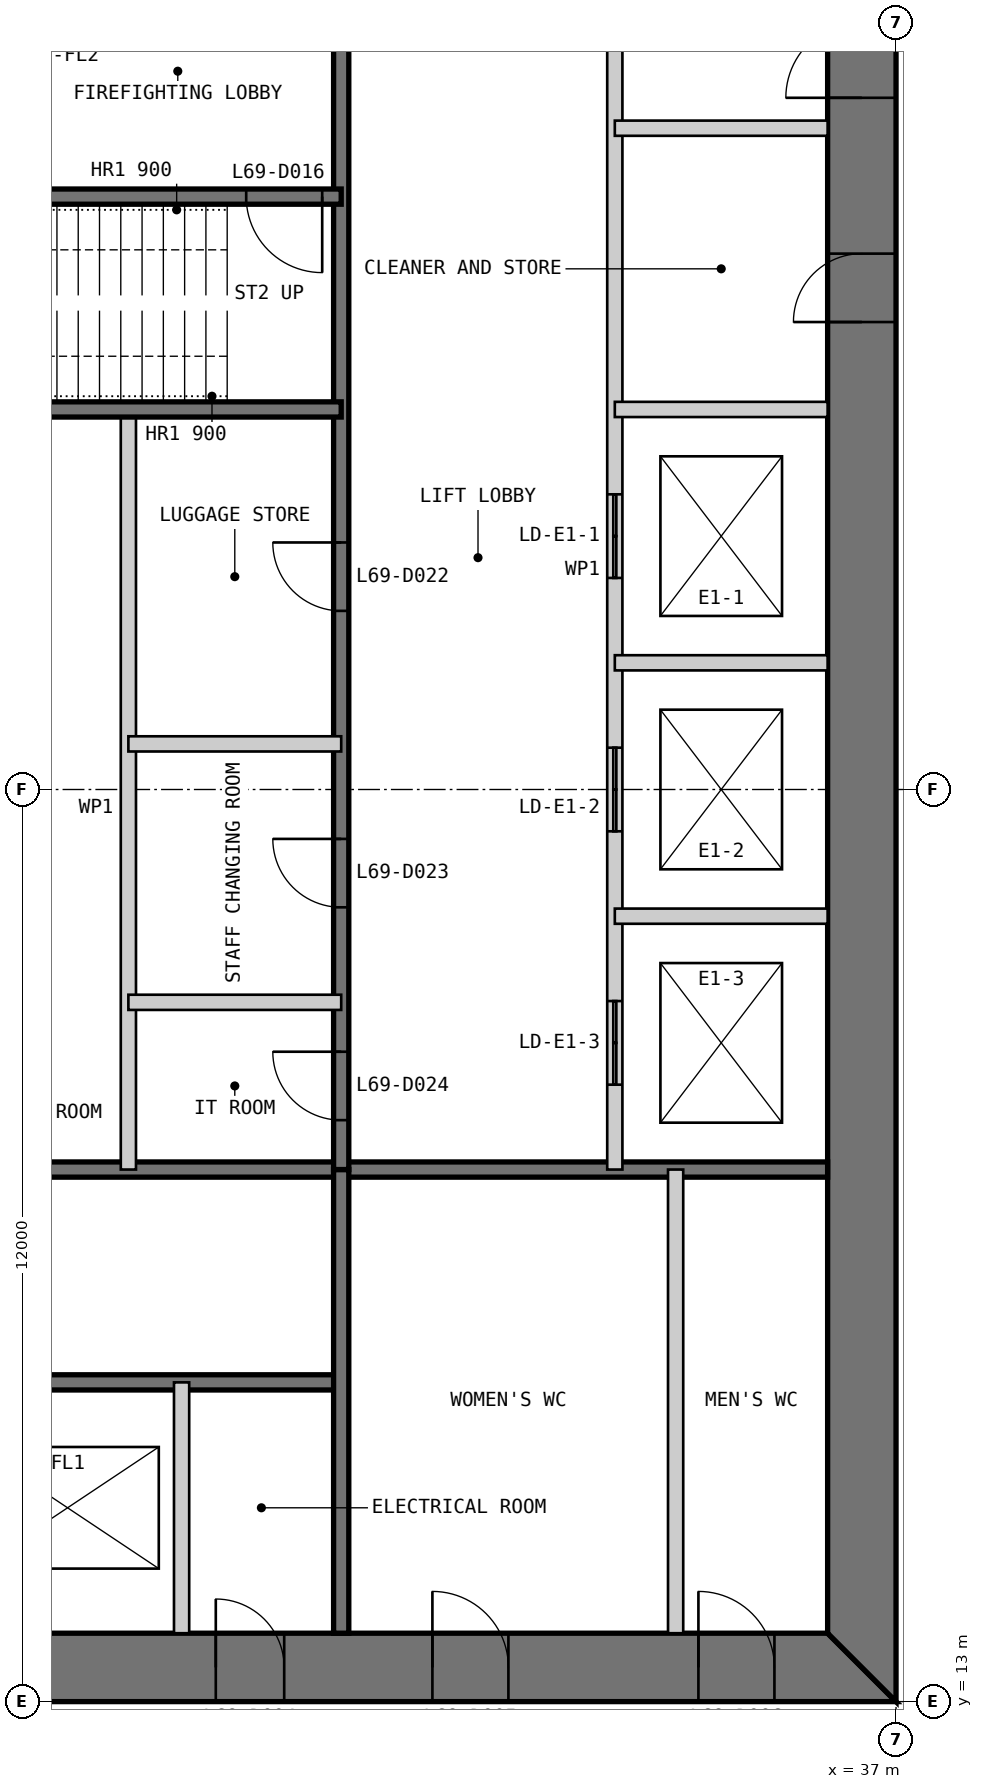
"""IFC4 building model, lengths in metres.
Left out: names, types, materials, properties, quantities, classifications, styles, units other than length and angle.
Written with IfcOpenShell. Run it as: python <this file> out.ifc"""

import sys

from ifc_helpers import new_model, si_unit, direction, frame, frame_2d, origin, place, context, subcontext, project, spatial, polyline, rectangle, outline, extrude, element, fill, save


model = new_model("IFC4")
c1 = context("Model", 3, precision=1e-05, world=origin(), true_north=direction((0.0, 1.0)))
c2 = subcontext(c1, "Body", "Model", "MODEL_VIEW")
j1 = project(units=[si_unit("LENGTHUNIT", "METRE"), si_unit("PLANEANGLEUNIT", "RADIAN")], contexts=[c1])
p1 = place(None, origin())
s1 = spatial("IfcSite", under=j1, at=p1, CompositionType="ELEMENT")
p2 = place(p1, origin())
s2 = spatial("IfcBuilding", under=s1, at=p2, CompositionType="ELEMENT")
p3 = place(p2, frame((0.0, 0.0, 286.6)))
s3 = spatial("IfcBuildingStorey", under=s2, at=p3, CompositionType="ELEMENT", Elevation=286.6)
p4 = place(p3, frame((13.0, 13.45, 0.0), z_axis=(0.0, 0.0, 1.0), x_axis=(1.0, 0.0, 0.0)))
e1 = element("IfcWall", 1, at=p4, inside=s3, PredefinedType="SHEAR", context=c2, shape_type="SweptSolid", body=[
    extrude(outline(polyline([(0.0, -0.45), (24.0, -0.45), (23.1, 0.45), (0.9, 0.45), (0.0, -0.45)])), origin(), (0.0, 0.0, 1.0), 3.4),
])
p5 = place(p4, frame((4.9, 0.0, 0.0)))
e2 = element("IfcOpeningElement", 2, at=p5, cuts=e1, PredefinedType="OPENING", context=c2, shape_type="SweptSolid", body=[
    extrude(rectangle(XDim=1.0, YDim=2.2, at=frame_2d((0.5, 1.1))), frame((0.0, 0.46, 0.0), z_axis=(0.0, -1.0, 0.0), x_axis=(1.0, 0.0, 0.0)), (0.0, 0.0, 1.0), 0.92),
])
p6 = place(p4, frame((8.9, 0.0, 0.0)))
e3 = element("IfcOpeningElement", 3, at=p6, cuts=e1, PredefinedType="OPENING", context=c2, shape_type="SweptSolid", body=[
    extrude(rectangle(XDim=1.1, YDim=2.2, at=frame_2d((0.55, 1.1))), frame((0.0, 0.46, 0.0), z_axis=(0.0, -1.0, 0.0), x_axis=(1.0, 0.0, 0.0)), (0.0, 0.0, 1.0), 0.92),
])
p7 = place(p4, frame((15.05, 0.0, 0.0)))
e4 = element("IfcOpeningElement", 4, at=p7, cuts=e1, PredefinedType="OPENING", context=c2, shape_type="SweptSolid", body=[
    extrude(rectangle(XDim=0.9, YDim=2.2, at=frame_2d((0.45, 1.1))), frame((0.0, 0.46, 0.0), z_axis=(0.0, -1.0, 0.0), x_axis=(1.0, 0.0, 0.0)), (0.0, 0.0, 1.0), 0.92),
])
p8 = place(p4, frame((17.9, 0.0, 0.0)))
e5 = element("IfcOpeningElement", 5, at=p8, cuts=e1, PredefinedType="OPENING", context=c2, shape_type="SweptSolid", body=[
    extrude(rectangle(XDim=1.0, YDim=2.2, at=frame_2d((0.5, 1.1))), frame((0.0, 0.46, 0.0), z_axis=(0.0, -1.0, 0.0), x_axis=(1.0, 0.0, 0.0)), (0.0, 0.0, 1.0), 0.92),
])
p9 = place(p4, frame((21.4, 0.0, 0.0)))
e6 = element("IfcOpeningElement", 6, at=p9, cuts=e1, PredefinedType="OPENING", context=c2, shape_type="SweptSolid", body=[
    extrude(rectangle(XDim=1.0, YDim=2.2, at=frame_2d((0.5, 1.1))), frame((0.0, 0.46, 0.0), z_axis=(0.0, -1.0, 0.0), x_axis=(1.0, 0.0, 0.0)), (0.0, 0.0, 1.0), 0.92),
])
p10 = place(p3, frame((36.55, 13.9, 0.0), z_axis=(0.0, 0.0, 1.0), x_axis=(0.0, 1.0, 0.0)))
e7 = element("IfcWall", 7, at=p10, inside=s3, PredefinedType="SHEAR", context=c2, shape_type="SweptSolid", body=[
    extrude(outline(polyline([(-0.9, -0.45), (23.1, -0.45), (22.2, 0.45), (0.0, 0.45), (-0.9, -0.45)])), origin(), (0.0, 0.0, 1.0), 3.4),
])
p11 = place(p10, frame((20.2, 0.0, 0.0)))
e8 = element("IfcOpeningElement", 8, at=p11, cuts=e7, PredefinedType="OPENING", context=c2, shape_type="SweptSolid", body=[
    extrude(rectangle(XDim=1.0, YDim=2.2, at=frame_2d((0.5, 1.1))), frame((0.0, 0.46, 0.0), z_axis=(0.0, -1.0, 0.0), x_axis=(1.0, 0.0, 0.0)), (0.0, 0.0, 1.0), 0.92),
])
p12 = place(p10, frame((17.25, 0.0, 0.0)))
e9 = element("IfcOpeningElement", 9, at=p12, cuts=e7, PredefinedType="OPENING", context=c2, shape_type="SweptSolid", body=[
    extrude(rectangle(XDim=0.9, YDim=2.2, at=frame_2d((0.45, 1.1))), frame((0.0, 0.46, 0.0), z_axis=(0.0, -1.0, 0.0), x_axis=(1.0, 0.0, 0.0)), (0.0, 0.0, 1.0), 0.92),
])
p13 = place(p3, frame((20.3, 17.2, 0.0), z_axis=(0.0, 0.0, 1.0), x_axis=(1.0, 0.0, 0.0)))
e10 = element("IfcWall", 10, at=p13, inside=s3, PredefinedType="SOLIDWALL", context=c2, shape_type="SweptSolid", body=[
    extrude(rectangle(XDim=9.4, YDim=0.2, at=frame_2d((4.7, 0.0))), origin(), (0.0, 0.0, 1.0), 3.2),
])
p14 = place(p13, frame((0.25, 0.0, 0.0)))
e11 = element("IfcOpeningElement", 11, at=p14, cuts=e10, PredefinedType="OPENING", context=c2, shape_type="SweptSolid", body=[
    extrude(rectangle(XDim=1.0, YDim=2.2, at=frame_2d((0.5, 1.1))), frame((0.0, 0.11, 0.0), z_axis=(0.0, -1.0, 0.0), x_axis=(1.0, 0.0, 0.0)), (0.0, 0.0, 1.0), 0.22),
])
p15 = place(p3, frame((20.3, 20.0, 0.0), z_axis=(0.0, 0.0, 1.0), x_axis=(1.0, 0.0, 0.0)))
e12 = element("IfcWall", 12, at=p15, inside=s3, PredefinedType="SOLIDWALL", context=c2, shape_type="SweptSolid", body=[
    extrude(rectangle(XDim=15.8, YDim=0.2, at=frame_2d((7.9, 0.0))), origin(), (0.0, 0.0, 1.0), 3.2),
])
p16 = place(p3, frame((27.6, 13.9, 0.0), z_axis=(0.0, 0.0, 1.0), x_axis=(0.0, 1.0, 0.0)))
e13 = element("IfcWall", 13, at=p16, inside=s3, PredefinedType="PARTITIONING", context=c2, shape_type="SweptSolid", body=[
    extrude(rectangle(XDim=3.3, YDim=0.2, at=frame_2d((1.65, 0.0))), origin(), (0.0, 0.0, 1.0), 3.2),
])
p17 = place(p3, frame((29.7, 13.9, 0.0), z_axis=(0.0, 0.0, 1.0), x_axis=(0.0, 1.0, 0.0)))
e14 = element("IfcWall", 14, at=p17, inside=s3, PredefinedType="SOLIDWALL", context=c2, shape_type="SweptSolid", body=[
    extrude(rectangle(XDim=6.1, YDim=0.2, at=frame_2d((3.05, 0.0))), origin(), (0.0, 0.0, 1.0), 3.2),
])
p18 = place(p3, frame((34.1, 13.9, 0.0), z_axis=(0.0, 0.0, 1.0), x_axis=(0.0, 1.0, 0.0)))
e15 = element("IfcWall", 15, at=p18, inside=s3, PredefinedType="PARTITIONING", context=c2, shape_type="SweptSolid", body=[
    extrude(rectangle(XDim=6.1, YDim=0.2, at=frame_2d((3.05, 0.0))), origin(), (0.0, 0.0, 1.0), 3.2),
])
p19 = place(p3, frame((33.3, 36.1, 0.0), z_axis=(0.0, 0.0, 1.0), x_axis=(0.0, -1.0, 0.0)))
e16 = element("IfcWall", 16, at=p19, inside=s3, PredefinedType="PARTITIONING", context=c2, shape_type="SweptSolid", body=[
    extrude(rectangle(XDim=16.1, YDim=0.2, at=frame_2d((8.05, 0.0))), origin(), (0.0, 0.0, 1.0), 3.2),
])
p20 = place(p19, frame((7.217, 0.0, 0.0)))
e17 = element("IfcOpeningElement", 17, at=p20, cuts=e16, PredefinedType="OPENING", context=c2, shape_type="SweptSolid", body=[
    extrude(rectangle(XDim=1.1, YDim=2.2, at=frame_2d((0.55, 1.1))), frame((0.0, 0.11, 0.0), z_axis=(0.0, -1.0, 0.0), x_axis=(1.0, 0.0, 0.0)), (0.0, 0.0, 1.0), 0.22),
])
p21 = place(p19, frame((10.55, 0.0, 0.0)))
e18 = element("IfcOpeningElement", 18, at=p21, cuts=e16, PredefinedType="OPENING", context=c2, shape_type="SweptSolid", body=[
    extrude(rectangle(XDim=1.1, YDim=2.2, at=frame_2d((0.55, 1.1))), frame((0.0, 0.11, 0.0), z_axis=(0.0, -1.0, 0.0), x_axis=(1.0, 0.0, 0.0)), (0.0, 0.0, 1.0), 0.22),
])
p22 = place(p19, frame((13.883, 0.0, 0.0)))
e19 = element("IfcOpeningElement", 19, at=p22, cuts=e16, PredefinedType="OPENING", context=c2, shape_type="SweptSolid", body=[
    extrude(rectangle(XDim=1.1, YDim=2.2, at=frame_2d((0.55, 1.1))), frame((0.0, 0.11, 0.0), z_axis=(0.0, -1.0, 0.0), x_axis=(1.0, 0.0, 0.0)), (0.0, 0.0, 1.0), 0.22),
])
p23 = place(p3, frame((29.7, 36.1, 0.0), z_axis=(0.0, 0.0, 1.0), x_axis=(0.0, -1.0, 0.0)))
e20 = element("IfcWall", 20, at=p23, inside=s3, PredefinedType="SOLIDWALL", context=c2, shape_type="SweptSolid", body=[
    extrude(rectangle(XDim=16.1, YDim=0.2, at=frame_2d((8.05, 0.0))), origin(), (0.0, 0.0, 1.0), 3.2),
])
p24 = place(p23, frame((7.85, 0.0, 0.0)))
e21 = element("IfcOpeningElement", 21, at=p24, cuts=e20, PredefinedType="OPENING", context=c2, shape_type="SweptSolid", body=[
    extrude(rectangle(XDim=0.9, YDim=2.2, at=frame_2d((0.45, 1.1))), frame((0.0, 0.11, 0.0), z_axis=(0.0, -1.0, 0.0), x_axis=(1.0, 0.0, 0.0)), (0.0, 0.0, 1.0), 0.22),
])
p25 = place(p23, frame((11.75, 0.0, 0.0)))
e22 = element("IfcOpeningElement", 22, at=p25, cuts=e20, PredefinedType="OPENING", context=c2, shape_type="SweptSolid", body=[
    extrude(rectangle(XDim=0.9, YDim=2.2, at=frame_2d((0.45, 1.1))), frame((0.0, 0.11, 0.0), z_axis=(0.0, -1.0, 0.0), x_axis=(1.0, 0.0, 0.0)), (0.0, 0.0, 1.0), 0.22),
])
p26 = place(p23, frame((14.55, 0.0, 0.0)))
e23 = element("IfcOpeningElement", 23, at=p26, cuts=e20, PredefinedType="OPENING", context=c2, shape_type="SweptSolid", body=[
    extrude(rectangle(XDim=0.9, YDim=2.2, at=frame_2d((0.45, 1.1))), frame((0.0, 0.11, 0.0), z_axis=(0.0, -1.0, 0.0), x_axis=(1.0, 0.0, 0.0)), (0.0, 0.0, 1.0), 0.22),
])
for number, where, z_axis, x_axis in (
    (24, (36.1, 30.0, 0.0), (0.0, 0.0, 1.0), (-1.0, 0.0, 0.0)),
    (25, (36.1, 26.667, 0.0), (0.0, 0.0, 1.0), (-1.0, 0.0, 0.0)),
    (26, (36.1, 23.333, 0.0), (0.0, 0.0, 1.0), (-1.0, 0.0, 0.0)),
):
    element("IfcWall", number, at=place(p3, frame(where, z_axis=z_axis, x_axis=x_axis)), inside=s3, PredefinedType="PARTITIONING", context=c2, shape_type="SweptSolid", body=[
        extrude(rectangle(XDim=2.8, YDim=0.2, at=frame_2d((1.4, 0.0))), origin(), (0.0, 0.0, 1.0), 3.2),
    ])
p27 = place(p3, frame((26.9, 30.0, 0.0), z_axis=(0.0, 0.0, 1.0), x_axis=(0.0, -1.0, 0.0)))
e27 = element("IfcWall", 27, at=p27, inside=s3, PredefinedType="PARTITIONING", context=c2, shape_type="SweptSolid", body=[
    extrude(rectangle(XDim=10.0, YDim=0.2, at=frame_2d((5.0, 0.0))), origin(), (0.0, 0.0, 1.0), 3.2),
])
p28 = place(p3, frame((29.7, 32.8, 0.0), z_axis=(0.0, 0.0, 1.0), x_axis=(-1.0, 0.0, 0.0)))
e28 = element("IfcWall", 28, at=p28, inside=s3, PredefinedType="SOLIDWALL", context=c2, shape_type="SweptSolid", body=[
    extrude(rectangle(XDim=9.4, YDim=0.2, at=frame_2d((4.7, 0.0))), origin(), (0.0, 0.0, 1.0), 3.2),
])
p29 = place(p28, frame((0.25, 0.0, 0.0)))
e29 = element("IfcOpeningElement", 29, at=p29, cuts=e28, PredefinedType="OPENING", context=c2, shape_type="SweptSolid", body=[
    extrude(rectangle(XDim=1.0, YDim=2.2, at=frame_2d((0.5, 1.1))), frame((0.0, 0.11, 0.0), z_axis=(0.0, -1.0, 0.0), x_axis=(1.0, 0.0, 0.0)), (0.0, 0.0, 1.0), 0.22),
])
p30 = place(p3, frame((29.7, 30.0, 0.0), z_axis=(0.0, 0.0, 1.0), x_axis=(-1.0, 0.0, 0.0)))
e30 = element("IfcWall", 30, at=p30, inside=s3, PredefinedType="SOLIDWALL", context=c2, shape_type="SweptSolid", body=[
    extrude(rectangle(XDim=15.8, YDim=0.2, at=frame_2d((7.9, 0.0))), origin(), (0.0, 0.0, 1.0), 3.2),
])
for number, where, z_axis, x_axis in (
    (31, (36.1, 33.7, 0.0), (0.0, 0.0, 1.0), (-1.0, 0.0, 0.0)),
    (32, (29.7, 25.6, 0.0), (0.0, 0.0, 1.0), (-1.0, 0.0, 0.0)),
    (33, (29.7, 22.2, 0.0), (0.0, 0.0, 1.0), (-1.0, 0.0, 0.0)),
):
    element("IfcWall", number, at=place(p3, frame(where, z_axis=z_axis, x_axis=x_axis)), inside=s3, PredefinedType="PARTITIONING", context=c2, shape_type="SweptSolid", body=[
        extrude(rectangle(XDim=2.8, YDim=0.2, at=frame_2d((1.4, 0.0))), origin(), (0.0, 0.0, 1.0), 3.2),
    ])
p31 = place(p7, origin())
e34 = element("IfcDoor", 34, at=p31, inside=s3, OperationType="SINGLE_SWING_LEFT", PredefinedType="DOOR", context=c2, shape_type="SweptSolid", body=[
    extrude(rectangle(XDim=0.9, YDim=2.2, at=frame_2d((0.45, 1.1))), frame((0.0, 0.025, 0.0), z_axis=(0.0, -1.0, 0.0), x_axis=(1.0, 0.0, 0.0)), (0.0, 0.0, 1.0), 0.05),
    extrude(outline(polyline([(0.0, 0.0), (0.04, 0.0), (0.04, 2.16), (0.86, 2.16), (0.86, 0.0), (0.9, 0.0), (0.9, 2.2), (0.0, 2.2), (0.0, 0.0)])), frame((0.0, 0.3, 0.0), z_axis=(0.0, -1.0, 0.0), x_axis=(1.0, 0.0, 0.0)), (0.0, 0.0, 1.0), 0.6),
])
fill(e4, e34)
p32 = place(p8, origin())
e35 = element("IfcDoor", 35, at=p32, inside=s3, OperationType="SINGLE_SWING_LEFT", PredefinedType="DOOR", context=c2, shape_type="SweptSolid", body=[
    extrude(rectangle(XDim=1.0, YDim=2.2, at=frame_2d((0.5, 1.1))), frame((0.0, 0.025, 0.0), z_axis=(0.0, -1.0, 0.0), x_axis=(1.0, 0.0, 0.0)), (0.0, 0.0, 1.0), 0.05),
    extrude(outline(polyline([(0.0, 0.0), (0.04, 0.0), (0.04, 2.16), (0.96, 2.16), (0.96, 0.0), (1.0, 0.0), (1.0, 2.2), (0.0, 2.2), (0.0, 0.0)])), frame((0.0, 0.3, 0.0), z_axis=(0.0, -1.0, 0.0), x_axis=(1.0, 0.0, 0.0)), (0.0, 0.0, 1.0), 0.6),
])
fill(e5, e35)
p33 = place(p9, origin())
e36 = element("IfcDoor", 36, at=p33, inside=s3, OperationType="SINGLE_SWING_LEFT", PredefinedType="DOOR", context=c2, shape_type="SweptSolid", body=[
    extrude(rectangle(XDim=1.0, YDim=2.2, at=frame_2d((0.5, 1.1))), frame((0.0, 0.025, 0.0), z_axis=(0.0, -1.0, 0.0), x_axis=(1.0, 0.0, 0.0)), (0.0, 0.0, 1.0), 0.05),
    extrude(outline(polyline([(0.0, 0.0), (0.04, 0.0), (0.04, 2.16), (0.96, 2.16), (0.96, 0.0), (1.0, 0.0), (1.0, 2.2), (0.0, 2.2), (0.0, 0.0)])), frame((0.0, 0.3, 0.0), z_axis=(0.0, -1.0, 0.0), x_axis=(1.0, 0.0, 0.0)), (0.0, 0.0, 1.0), 0.6),
])
fill(e6, e36)
p34 = place(p29, origin())
e37 = element("IfcDoor", 37, at=p34, inside=s3, OperationType="SINGLE_SWING_LEFT", PredefinedType="DOOR", context=c2, shape_type="SweptSolid", body=[
    extrude(rectangle(XDim=1.0, YDim=2.2, at=frame_2d((0.5, 1.1))), frame((0.0, 0.025, 0.0), z_axis=(0.0, -1.0, 0.0), x_axis=(1.0, 0.0, 0.0)), (0.0, 0.0, 1.0), 0.05),
])
fill(e29, e37)
p35 = place(p11, origin())
e38 = element("IfcDoor", 38, at=p35, inside=s3, OperationType="SINGLE_SWING_LEFT", PredefinedType="DOOR", context=c2, shape_type="SweptSolid", body=[
    extrude(rectangle(XDim=1.0, YDim=2.2, at=frame_2d((0.5, 1.1))), frame((0.0, 0.025, 0.0), z_axis=(0.0, -1.0, 0.0), x_axis=(1.0, 0.0, 0.0)), (0.0, 0.0, 1.0), 0.05),
    extrude(outline(polyline([(0.0, 0.0), (0.04, 0.0), (0.04, 2.16), (0.96, 2.16), (0.96, 0.0), (1.0, 0.0), (1.0, 2.2), (0.0, 2.2), (0.0, 0.0)])), frame((0.0, 0.3, 0.0), z_axis=(0.0, -1.0, 0.0), x_axis=(1.0, 0.0, 0.0)), (0.0, 0.0, 1.0), 0.6),
])
fill(e8, e38)
p36 = place(p12, origin())
e39 = element("IfcDoor", 39, at=p36, inside=s3, OperationType="SINGLE_SWING_LEFT", PredefinedType="DOOR", context=c2, shape_type="SweptSolid", body=[
    extrude(rectangle(XDim=0.9, YDim=2.2, at=frame_2d((0.45, 1.1))), frame((0.0, 0.025, 0.0), z_axis=(0.0, -1.0, 0.0), x_axis=(1.0, 0.0, 0.0)), (0.0, 0.0, 1.0), 0.05),
    extrude(outline(polyline([(0.0, 0.0), (0.04, 0.0), (0.04, 2.16), (0.86, 2.16), (0.86, 0.0), (0.9, 0.0), (0.9, 2.2), (0.0, 2.2), (0.0, 0.0)])), frame((0.0, 0.3, 0.0), z_axis=(0.0, -1.0, 0.0), x_axis=(1.0, 0.0, 0.0)), (0.0, 0.0, 1.0), 0.6),
])
fill(e9, e39)
p37 = place(p24, frame((0.9, 0.0, 0.0), z_axis=(0.0, 0.0, 1.0), x_axis=(-1.0, 0.0, 0.0)))
e40 = element("IfcDoor", 40, at=p37, inside=s3, OperationType="SINGLE_SWING_RIGHT", PredefinedType="DOOR", context=c2, shape_type="SweptSolid", body=[
    extrude(rectangle(XDim=0.9, YDim=2.2, at=frame_2d((0.45, 1.1))), frame((0.0, 0.025, 0.0), z_axis=(0.0, -1.0, 0.0), x_axis=(1.0, 0.0, 0.0)), (0.0, 0.0, 1.0), 0.05),
])
fill(e21, e40)
p38 = place(p25, frame((0.9, 0.0, 0.0), z_axis=(0.0, 0.0, 1.0), x_axis=(-1.0, 0.0, 0.0)))
e41 = element("IfcDoor", 41, at=p38, inside=s3, OperationType="SINGLE_SWING_RIGHT", PredefinedType="DOOR", context=c2, shape_type="SweptSolid", body=[
    extrude(rectangle(XDim=0.9, YDim=2.2, at=frame_2d((0.45, 1.1))), frame((0.0, 0.025, 0.0), z_axis=(0.0, -1.0, 0.0), x_axis=(1.0, 0.0, 0.0)), (0.0, 0.0, 1.0), 0.05),
])
fill(e22, e41)
p39 = place(p26, frame((0.9, 0.0, 0.0), z_axis=(0.0, 0.0, 1.0), x_axis=(-1.0, 0.0, 0.0)))
e42 = element("IfcDoor", 42, at=p39, inside=s3, OperationType="SINGLE_SWING_RIGHT", PredefinedType="DOOR", context=c2, shape_type="SweptSolid", body=[
    extrude(rectangle(XDim=0.9, YDim=2.2, at=frame_2d((0.45, 1.1))), frame((0.0, 0.025, 0.0), z_axis=(0.0, -1.0, 0.0), x_axis=(1.0, 0.0, 0.0)), (0.0, 0.0, 1.0), 0.05),
])
fill(e23, e42)
p40 = place(p20, origin())
e43 = element("IfcDoor", 43, at=p40, inside=s3, OperationType="DOUBLE_DOOR_SLIDING", PredefinedType="DOOR", context=c2, shape_type="SweptSolid", body=[
    extrude(rectangle(XDim=1.1, YDim=2.2, at=frame_2d((0.55, 1.1))), frame((0.0, 0.025, 0.0), z_axis=(0.0, -1.0, 0.0), x_axis=(1.0, 0.0, 0.0)), (0.0, 0.0, 1.0), 0.05),
])
fill(e17, e43)
p41 = place(p21, origin())
e44 = element("IfcDoor", 44, at=p41, inside=s3, OperationType="DOUBLE_DOOR_SLIDING", PredefinedType="DOOR", context=c2, shape_type="SweptSolid", body=[
    extrude(rectangle(XDim=1.1, YDim=2.2, at=frame_2d((0.55, 1.1))), frame((0.0, 0.025, 0.0), z_axis=(0.0, -1.0, 0.0), x_axis=(1.0, 0.0, 0.0)), (0.0, 0.0, 1.0), 0.05),
])
fill(e18, e44)
p42 = place(p22, origin())
e45 = element("IfcDoor", 45, at=p42, inside=s3, OperationType="DOUBLE_DOOR_SLIDING", PredefinedType="DOOR", context=c2, shape_type="SweptSolid", body=[
    extrude(rectangle(XDim=1.1, YDim=2.2, at=frame_2d((0.55, 1.1))), frame((0.0, 0.025, 0.0), z_axis=(0.0, -1.0, 0.0), x_axis=(1.0, 0.0, 0.0)), (0.0, 0.0, 1.0), 0.05),
])
fill(e19, e45)
save(model, sys.argv[1])
